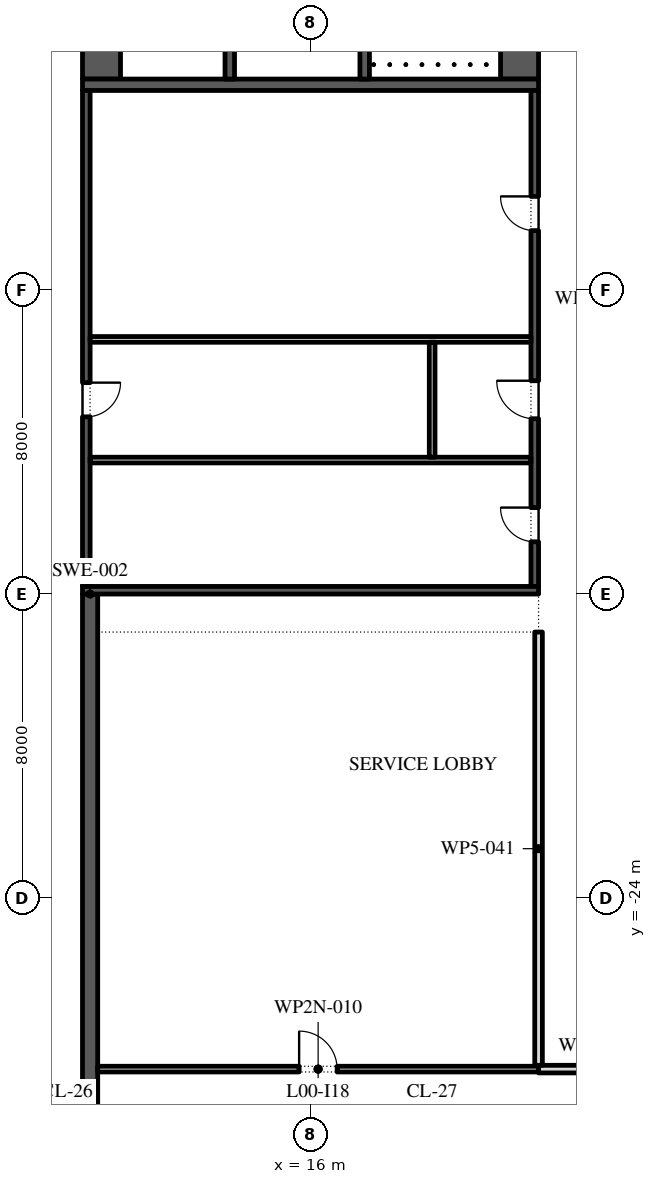
"""IFC4 building model, lengths in metres.
Left out: names, types, materials, properties, quantities, classifications, styles, units other than length and angle.
Written with IfcOpenShell. Run it as: python <this file> out.ifc"""

import sys

from ifc_helpers import new_model, si_unit, direction, frame, frame_2d, origin, place, context, subcontext, project, spatial, rectangle, extrude, element, fill, save


model = new_model("IFC4")
c1 = context("Model", 3, precision=1e-05, world=origin(), true_north=direction((0.0, 1.0)))
c2 = subcontext(c1, "Body", "Model", "MODEL_VIEW")
j1 = project(units=[si_unit("LENGTHUNIT", "METRE"), si_unit("PLANEANGLEUNIT", "RADIAN")], contexts=[c1])
p1 = place(None, origin())
s1 = spatial("IfcSite", under=j1, at=p1, CompositionType="ELEMENT")
p2 = place(p1, origin())
s2 = spatial("IfcBuilding", under=s1, at=p2, CompositionType="ELEMENT")
p3 = place(p2, origin())
s3 = spatial("IfcBuildingStorey", under=s2, at=p3, CompositionType="ELEMENT", Elevation=0.0)
p4 = place(p3, frame((10.2, -31.0, 0.0), z_axis=(0.0, 0.0, 1.0), x_axis=(0.0, 1.0, 0.0)))
e1 = element("IfcWall", 1, at=p4, inside=s3, PredefinedType="SHEAR", context=c2, shape_type="SweptSolid", body=[
    extrude(rectangle(XDim=15.0, YDim=0.4, at=frame_2d((7.5, 0.0))), origin(), (0.0, 0.0, 1.0), 7.7),
])
p5 = place(p3, frame((21.5, -2.45, 0.0), z_axis=(0.0, 0.0, 1.0), x_axis=(0.0, 1.0, 0.0)))
e2 = element("IfcWall", 2, at=p5, inside=s3, PredefinedType="SHEAR", context=c2, shape_type="SweptSolid", body=[
    extrude(rectangle(XDim=27.9, YDim=1.0, at=frame_2d((13.95, 0.0))), origin(), (0.0, 0.0, 1.0), 7.7),
])
p6 = place(p5, frame((5.05, 0.0, 0.0)))
e3 = element("IfcOpeningElement", 3, at=p6, cuts=e2, PredefinedType="OPENING", context=c2, shape_type="SweptSolid", body=[
    extrude(rectangle(XDim=1.2, YDim=2.1, at=frame_2d((0.6, 1.05))), frame((0.0, 0.51, 0.0), z_axis=(0.0, -1.0, 0.0), x_axis=(1.0, 0.0, 0.0)), (0.0, 0.0, 1.0), 1.02),
])
p7 = place(p5, frame((21.65, 0.0, 0.0)))
e4 = element("IfcOpeningElement", 4, at=p7, cuts=e2, PredefinedType="OPENING", context=c2, shape_type="SweptSolid", body=[
    extrude(rectangle(XDim=1.2, YDim=2.1, at=frame_2d((0.6, 1.05))), frame((0.0, 0.51, 0.0), z_axis=(0.0, -1.0, 0.0), x_axis=(1.0, 0.0, 0.0)), (0.0, 0.0, 1.0), 1.02),
])
p8 = place(p3, frame((10.5, -2.45, 0.0), z_axis=(0.0, 0.0, 1.0), x_axis=(0.0, 1.0, 0.0)))
e5 = element("IfcWall", 5, at=p8, inside=s3, PredefinedType="SHEAR", context=c2, shape_type="SweptSolid", body=[
    extrude(rectangle(XDim=27.9, YDim=1.0, at=frame_2d((13.95, 0.0))), origin(), (0.0, 0.0, 1.0), 7.7),
])
p9 = place(p8, frame((23.65, 0.0, 0.0)))
e6 = element("IfcOpeningElement", 6, at=p9, cuts=e5, PredefinedType="OPENING", context=c2, shape_type="SweptSolid", body=[
    extrude(rectangle(XDim=2.4, YDim=2.1, at=frame_2d((1.2, 1.05))), frame((0.0, 0.51, 0.0), z_axis=(0.0, -1.0, 0.0), x_axis=(1.0, 0.0, 0.0)), (0.0, 0.0, 1.0), 1.02),
])
p10 = place(p8, frame((2.7, 0.0, 0.0)))
e7 = element("IfcOpeningElement", 7, at=p10, cuts=e5, PredefinedType="OPENING", context=c2, shape_type="SweptSolid", body=[
    extrude(rectangle(XDim=0.9, YDim=2.1, at=frame_2d((0.45, 1.05))), frame((0.0, 0.51, 0.0), z_axis=(0.0, -1.0, 0.0), x_axis=(1.0, 0.0, 0.0)), (0.0, 0.0, 1.0), 1.02),
])
p11 = place(p3, frame((10.0, -2.6, 0.0), z_axis=(0.0, 0.0, 1.0), x_axis=(1.0, 0.0, 0.0)))
e8 = element("IfcWall", 8, at=p11, inside=s3, PredefinedType="SHEAR", context=c2, shape_type="SweptSolid", body=[
    extrude(rectangle(XDim=12.0, YDim=0.3, at=frame_2d((6.0, 0.0))), origin(), (0.0, 0.0, 1.0), 7.7),
])
p12 = place(p3, frame((17.425, -2.45, 0.0), z_axis=(0.0, 0.0, 1.0), x_axis=(0.0, 1.0, 0.0)))
e9 = element("IfcWall", 9, at=p12, inside=s3, PredefinedType="SHEAR", context=c2, shape_type="SweptSolid", body=[
    extrude(rectangle(XDim=6.3, YDim=0.25, at=frame_2d((3.15, 0.0))), origin(), (0.0, 0.0, 1.0), 7.7),
])
p13 = place(p12, frame((5.05, 0.0, 0.0)))
e10 = element("IfcOpeningElement", 10, at=p13, cuts=e9, PredefinedType="OPENING", context=c2, shape_type="SweptSolid", body=[
    extrude(rectangle(XDim=1.2, YDim=2.1, at=frame_2d((0.6, 1.05))), frame((0.0, 0.135, 0.0), z_axis=(0.0, -1.0, 0.0), x_axis=(1.0, 0.0, 0.0)), (0.0, 0.0, 1.0), 0.27),
])
p14 = place(p3, frame((13.875, -2.45, 0.0), z_axis=(0.0, 0.0, 1.0), x_axis=(0.0, 1.0, 0.0)))
e11 = element("IfcWall", 11, at=p14, inside=s3, PredefinedType="SHEAR", context=c2, shape_type="SweptSolid", body=[
    extrude(rectangle(XDim=21.3, YDim=0.25, at=frame_2d((10.65, 0.0))), origin(), (0.0, 0.0, 1.0), 7.7),
])
p15 = place(p14, frame((10.196, 0.0, 0.0)))
e12 = element("IfcOpeningElement", 12, at=p15, cuts=e11, PredefinedType="OPENING", context=c2, shape_type="SweptSolid", body=[
    extrude(rectangle(XDim=0.9, YDim=2.1, at=frame_2d((0.45, 1.05))), frame((0.0, 0.135, 0.0), z_axis=(0.0, -1.0, 0.0), x_axis=(1.0, 0.0, 0.0)), (0.0, 0.0, 1.0), 0.27),
])
p16 = place(p14, frame((16.475, 0.0, 0.0)))
e13 = element("IfcOpeningElement", 13, at=p16, cuts=e11, PredefinedType="OPENING", context=c2, shape_type="SweptSolid", body=[
    extrude(rectangle(XDim=0.9, YDim=2.1, at=frame_2d((0.45, 1.05))), frame((0.0, 0.135, 0.0), z_axis=(0.0, -1.0, 0.0), x_axis=(1.0, 0.0, 0.0)), (0.0, 0.0, 1.0), 0.27),
])
p17 = place(p14, frame((6.971, 0.0, 0.0)))
e14 = element("IfcOpeningElement", 14, at=p17, cuts=e11, PredefinedType="OPENING", context=c2, shape_type="SweptSolid", body=[
    extrude(rectangle(XDim=1.1, YDim=2.1, at=frame_2d((0.55, 1.05))), frame((0.0, 0.135, 0.0), z_axis=(0.0, -1.0, 0.0), x_axis=(1.0, 0.0, 0.0)), (0.0, 0.0, 1.0), 0.27),
])
p18 = place(p3, frame((21.9, -15.8, 0.0), z_axis=(0.0, 0.0, 1.0), x_axis=(0.0, 1.0, 0.0)))
e15 = element("IfcWall", 15, at=p18, inside=s3, PredefinedType="SHEAR", context=c2, shape_type="SweptSolid", body=[
    extrude(rectangle(XDim=13.05, YDim=0.2, at=frame_2d((6.525, 0.0))), origin(), (0.0, 0.0, 1.0), 7.7),
])
p19 = place(p18, frame((1.175, 0.0, 0.0)))
e16 = element("IfcOpeningElement", 16, at=p19, cuts=e15, PredefinedType="OPENING", context=c2, shape_type="SweptSolid", body=[
    extrude(rectangle(XDim=0.9, YDim=2.1, at=frame_2d((0.45, 1.05))), frame((0.0, 0.11, 0.0), z_axis=(0.0, -1.0, 0.0), x_axis=(1.0, 0.0, 0.0)), (0.0, 0.0, 1.0), 0.22),
])
p20 = place(p18, frame((4.413, 0.0, 0.0)))
e17 = element("IfcOpeningElement", 17, at=p20, cuts=e15, PredefinedType="OPENING", context=c2, shape_type="SweptSolid", body=[
    extrude(rectangle(XDim=1.0, YDim=2.1, at=frame_2d((0.5, 1.05))), frame((0.0, 0.11, 0.0), z_axis=(0.0, -1.0, 0.0), x_axis=(1.0, 0.0, 0.0)), (0.0, 0.0, 1.0), 0.22),
])
p21 = place(p18, frame((9.363, 0.0, 0.0)))
e18 = element("IfcOpeningElement", 18, at=p21, cuts=e15, PredefinedType="OPENING", context=c2, shape_type="SweptSolid", body=[
    extrude(rectangle(XDim=0.9, YDim=2.1, at=frame_2d((0.45, 1.05))), frame((0.0, 0.11, 0.0), z_axis=(0.0, -1.0, 0.0), x_axis=(1.0, 0.0, 0.0)), (0.0, 0.0, 1.0), 0.22),
])
p22 = place(p3, frame((10.1, -15.8, 0.0), z_axis=(0.0, 0.0, 1.0), x_axis=(0.0, 1.0, 0.0)))
e19 = element("IfcWall", 19, at=p22, inside=s3, PredefinedType="SHEAR", context=c2, shape_type="SweptSolid", body=[
    extrude(rectangle(XDim=13.05, YDim=0.2, at=frame_2d((6.525, 0.0))), origin(), (0.0, 0.0, 1.0), 7.7),
])
p23 = place(p22, frame((4.462, 0.0, 0.0)))
e20 = element("IfcOpeningElement", 20, at=p23, cuts=e19, PredefinedType="OPENING", context=c2, shape_type="SweptSolid", body=[
    extrude(rectangle(XDim=0.9, YDim=2.1, at=frame_2d((0.45, 1.05))), frame((0.0, 0.11, 0.0), z_axis=(0.0, -1.0, 0.0), x_axis=(1.0, 0.0, 0.0)), (0.0, 0.0, 1.0), 0.22),
])
p24 = place(p3, frame((10.0, -15.9, 0.0), z_axis=(0.0, 0.0, 1.0), x_axis=(1.0, 0.0, 0.0)))
e21 = element("IfcWall", 21, at=p24, inside=s3, PredefinedType="SHEAR", context=c2, shape_type="SweptSolid", body=[
    extrude(rectangle(XDim=12.0, YDim=0.2, at=frame_2d((6.0, 0.0))), origin(), (0.0, 0.0, 1.0), 7.7),
])
for number, where, z_axis, x_axis in (
    (22, (10.2, -9.3, 0.0), (0.0, 0.0, 1.0), (1.0, 0.0, 0.0)),
    (23, (10.2, -12.475, 0.0), (0.0, 0.0, 1.0), (1.0, 0.0, 0.0)),
):
    element("IfcWall", number, at=place(p3, frame(where, z_axis=z_axis, x_axis=x_axis)), inside=s3, PredefinedType="PARTITIONING", context=c2, shape_type="SweptSolid", body=[
        extrude(rectangle(XDim=11.6, YDim=0.15, at=frame_2d((5.8, 0.0))), origin(), (0.0, 0.0, 1.0), 7.7),
    ])
p25 = place(p3, frame((19.2, -12.4, 0.0), z_axis=(0.0, 0.0, 1.0), x_axis=(0.0, 1.0, 0.0)))
e24 = element("IfcWall", 24, at=p25, inside=s3, PredefinedType="PARTITIONING", context=c2, shape_type="SweptSolid", body=[
    extrude(rectangle(XDim=3.025, YDim=0.15, at=frame_2d((1.512, 0.0))), origin(), (0.0, 0.0, 1.0), 7.7),
])
p26 = place(p3, frame((10.4, -28.5, 0.0), z_axis=(0.0, 0.0, 1.0), x_axis=(1.0, 0.0, 0.0)))
e25 = element("IfcWall", 25, at=p26, inside=s3, PredefinedType="PARTITIONING", context=c2, shape_type="SweptSolid", body=[
    extrude(rectangle(XDim=11.6, YDim=0.15, at=frame_2d((5.8, 0.0))), origin(), (0.0, 0.0, 1.0), 7.7),
])
p27 = place(p26, frame((5.3, 0.0, 0.0)))
e26 = element("IfcOpeningElement", 26, at=p27, cuts=e25, PredefinedType="OPENING", context=c2, shape_type="SweptSolid", body=[
    extrude(rectangle(XDim=1.0, YDim=2.1, at=frame_2d((0.5, 1.05))), frame((0.0, 0.085, 0.0), z_axis=(0.0, -1.0, 0.0), x_axis=(1.0, 0.0, 0.0)), (0.0, 0.0, 1.0), 0.17),
])
p28 = place(p3, frame((22.0, -28.5, 0.0), z_axis=(0.0, 0.0, 1.0), x_axis=(1.0, 0.0, 0.0)))
e27 = element("IfcWall", 27, at=p28, inside=s3, PredefinedType="PARTITIONING", context=c2, shape_type="SweptSolid", body=[
    extrude(rectangle(XDim=3.0, YDim=0.2, at=frame_2d((1.5, 0.0))), origin(), (0.0, 0.0, 1.0), 7.7),
])
p29 = place(p3, frame((22.0, -28.4, 0.0), z_axis=(0.0, 0.0, 1.0), x_axis=(0.0, 1.0, 0.0)))
e28 = element("IfcWall", 28, at=p29, inside=s3, PredefinedType="PARTITIONING", context=c2, shape_type="SweptSolid", body=[
    extrude(rectangle(XDim=11.4, YDim=0.2, at=frame_2d((5.7, 0.0))), origin(), (0.0, 0.0, 1.0), 7.7),
])
p30 = place(p19, origin())
e29 = element("IfcDoor", 29, at=p30, inside=s3, OperationType="SINGLE_SWING_LEFT", PredefinedType="DOOR", context=c2, shape_type="SweptSolid", body=[
    extrude(rectangle(XDim=0.9, YDim=2.1, at=frame_2d((0.45, 1.05))), frame((0.0, 0.1, 0.0), z_axis=(0.0, -1.0, 0.0), x_axis=(1.0, 0.0, 0.0)), (0.0, 0.0, 1.0), 0.05),
])
fill(e16, e29)
p31 = place(p20, origin())
e30 = element("IfcDoor", 30, at=p31, inside=s3, OperationType="SINGLE_SWING_LEFT", PredefinedType="DOOR", context=c2, shape_type="SweptSolid", body=[
    extrude(rectangle(XDim=1.0, YDim=2.1, at=frame_2d((0.5, 1.05))), frame((0.0, 0.1, 0.0), z_axis=(0.0, -1.0, 0.0), x_axis=(1.0, 0.0, 0.0)), (0.0, 0.0, 1.0), 0.05),
])
fill(e17, e30)
p32 = place(p23, frame((0.9, -0.15, 0.0), z_axis=(0.0, 0.0, 1.0), x_axis=(-1.0, 0.0, 0.0)))
e31 = element("IfcDoor", 31, at=p32, inside=s3, OperationType="SINGLE_SWING_RIGHT", PredefinedType="DOOR", context=c2, shape_type="SweptSolid", body=[
    extrude(rectangle(XDim=0.9, YDim=2.1, at=frame_2d((0.45, 1.05))), frame((0.0, -0.05, 0.0), z_axis=(0.0, -1.0, 0.0), x_axis=(1.0, 0.0, 0.0)), (0.0, 0.0, 1.0), 0.05),
])
fill(e20, e31)
p33 = place(p21, origin())
e32 = element("IfcDoor", 32, at=p33, inside=s3, OperationType="SINGLE_SWING_LEFT", PredefinedType="DOOR", context=c2, shape_type="SweptSolid", body=[
    extrude(rectangle(XDim=0.9, YDim=2.1, at=frame_2d((0.45, 1.05))), frame((0.0, 0.1, 0.0), z_axis=(0.0, -1.0, 0.0), x_axis=(1.0, 0.0, 0.0)), (0.0, 0.0, 1.0), 0.05),
])
fill(e18, e32)
p34 = place(p27, origin())
e33 = element("IfcDoor", 33, at=p34, inside=s3, OperationType="SINGLE_SWING_RIGHT", PredefinedType="DOOR", context=c2, shape_type="SweptSolid", body=[
    extrude(rectangle(XDim=1.0, YDim=2.1, at=frame_2d((0.5, 1.05))), frame((0.0, 0.025, 0.0), z_axis=(0.0, -1.0, 0.0), x_axis=(1.0, 0.0, 0.0)), (0.0, 0.0, 1.0), 0.05),
])
fill(e26, e33)
save(model, sys.argv[1])
